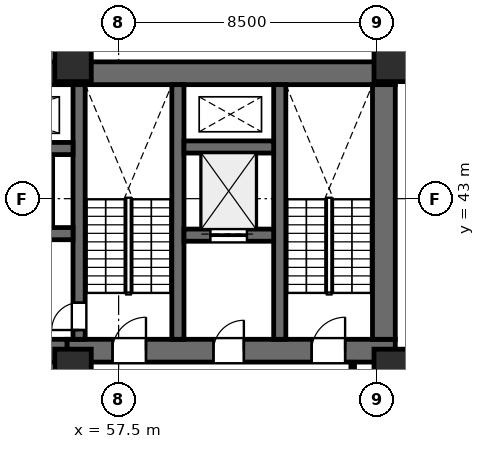
"""IFC4 building model, lengths in metres.
Left out: names, types, materials, properties, quantities, classifications, styles, units other than length and angle.
Written with IfcOpenShell. Run it as: python <this file> out.ifc"""

import sys

from ifc_helpers import new_model, si_unit, direction, frame, frame_2d, origin, origin_2d, place, context, subcontext, project, spatial, rectangle, extrude, element, fill, save


model = new_model("IFC4")
c1 = context("Model", 3, precision=1e-05, world=origin(), true_north=direction((0.0, 1.0)))
c2 = subcontext(c1, "Body", "Model", "MODEL_VIEW")
j1 = project(units=[si_unit("LENGTHUNIT", "METRE"), si_unit("PLANEANGLEUNIT", "RADIAN")], contexts=[c1])
p1 = place(None, origin())
s1 = spatial("IfcSite", under=j1, at=p1, CompositionType="ELEMENT")
p2 = place(p1, origin())
s2 = spatial("IfcBuilding", under=s1, at=p2, CompositionType="ELEMENT")
p3 = place(p2, frame((0.0, 0.0, 29.5)))
s3 = spatial("IfcBuildingStorey", under=s2, at=p3, CompositionType="ELEMENT", Elevation=29.5)
p4 = place(p3, frame((22.9, 47.125, 0.0), z_axis=(0.0, 0.0, 1.0), x_axis=(1.0, 0.0, 0.0)))
e1 = element("IfcWall", 1, at=p4, inside=s3, PredefinedType="SHEAR", context=c2, shape_type="SweptSolid", body=[
    extrude(rectangle(XDim=43.7, YDim=0.75, at=frame_2d((21.85, 0.0))), origin(), (0.0, 0.0, 1.0), 4.0),
])
p5 = place(p3, frame((55.8, 38.0, 0.0), z_axis=(0.0, 0.0, 1.0), x_axis=(1.0, 0.0, 0.0)))
e2 = element("IfcWall", 2, at=p5, inside=s3, PredefinedType="SHEAR", context=c2, shape_type="SweptSolid", body=[
    extrude(rectangle(XDim=10.8, YDim=0.75, at=frame_2d((5.4, 0.0))), origin(), (0.0, 0.0, 1.0), 4.0),
])
p6 = place(p5, frame((1.5, 0.0, 0.0)))
e3 = element("IfcOpeningElement", 3, at=p6, cuts=e2, PredefinedType="OPENING", context=c2, shape_type="SweptSolid", body=[
    extrude(rectangle(XDim=1.1, YDim=2.2, at=frame_2d((0.55, 1.1))), frame((0.0, 0.385, 0.0), z_axis=(0.0, -1.0, 0.0), x_axis=(1.0, 0.0, 0.0)), (0.0, 0.0, 1.0), 0.77),
])
p7 = place(p5, frame((4.82, 0.0, 0.0)))
e4 = element("IfcOpeningElement", 4, at=p7, cuts=e2, PredefinedType="OPENING", context=c2, shape_type="SweptSolid", body=[
    extrude(rectangle(XDim=1.0, YDim=2.15, at=frame_2d((0.5, 1.075))), frame((0.0, 0.385, 0.0), z_axis=(0.0, -1.0, 0.0), x_axis=(1.0, 0.0, 0.0)), (0.0, 0.0, 1.0), 0.77),
])
p8 = place(p5, frame((8.05, 0.0, 0.0)))
e5 = element("IfcOpeningElement", 5, at=p8, cuts=e2, PredefinedType="OPENING", context=c2, shape_type="SweptSolid", body=[
    extrude(rectangle(XDim=1.1, YDim=2.2, at=frame_2d((0.55, 1.1))), frame((0.0, 0.385, 0.0), z_axis=(0.0, -1.0, 0.0), x_axis=(1.0, 0.0, 0.0)), (0.0, 0.0, 1.0), 0.77),
])
p9 = place(p3, frame((66.225, 38.375, 0.0), z_axis=(0.0, 0.0, 1.0), x_axis=(0.0, 1.0, 0.0)))
e6 = element("IfcWall", 6, at=p9, inside=s3, PredefinedType="SHEAR", context=c2, shape_type="SweptSolid", body=[
    extrude(rectangle(XDim=8.375, YDim=0.75, at=frame_2d((4.188, 0.0))), origin(), (0.0, 0.0, 1.0), 4.0),
])
for number, where, z_axis, x_axis in (
    (7, (62.8, 38.375, 0.0), (0.0, 0.0, 1.0), (0.0, 1.0, 0.0)),
    (8, (59.45, 38.375, 0.0), (0.0, 0.0, 1.0), (0.0, 1.0, 0.0)),
):
    element("IfcWall", number, at=place(p3, frame(where, z_axis=z_axis, x_axis=x_axis)), inside=s3, PredefinedType="SHEAR", context=c2, shape_type="SweptSolid", body=[
        extrude(rectangle(XDim=8.375, YDim=0.4, at=frame_2d((4.188, 0.0))), origin(), (0.0, 0.0, 1.0), 4.0),
    ])
p10 = place(p3, frame((56.2, 38.375, 0.0), z_axis=(0.0, 0.0, 1.0), x_axis=(0.0, 1.0, 0.0)))
e9 = element("IfcWall", 9, at=p10, inside=s3, PredefinedType="SHEAR", context=c2, shape_type="SweptSolid", body=[
    extrude(rectangle(XDim=8.375, YDim=0.4, at=frame_2d((4.188, 0.0))), origin(), (0.0, 0.0, 1.0), 4.0),
])
p11 = place(p10, frame((0.305, 0.0, 0.0)))
e10 = element("IfcOpeningElement", 10, at=p11, cuts=e9, PredefinedType="OPENING", context=c2, shape_type="SweptSolid", body=[
    extrude(rectangle(XDim=0.9, YDim=2.15, at=frame_2d((0.45, 1.075))), frame((0.0, 0.21, 0.0), z_axis=(0.0, -1.0, 0.0), x_axis=(1.0, 0.0, 0.0)), (0.0, 0.0, 1.0), 0.42),
])
p12 = place(p3, frame((59.65, 41.8, 0.0), z_axis=(0.0, 0.0, 1.0), x_axis=(1.0, 0.0, 0.0)))
e11 = element("IfcWall", 11, at=p12, inside=s3, PredefinedType="SHEAR", context=c2, shape_type="SweptSolid", body=[
    extrude(rectangle(XDim=2.95, YDim=0.4, at=frame_2d((1.475, 0.0))), origin(), (0.0, 0.0, 1.0), 4.0),
])
p13 = place(p12, frame((0.87, 0.0, 0.0)))
e12 = element("IfcOpeningElement", 12, at=p13, cuts=e11, PredefinedType="OPENING", context=c2, shape_type="SweptSolid", body=[
    extrude(rectangle(XDim=1.2, YDim=2.2, at=frame_2d((0.6, 1.1))), frame((0.0, 0.21, 0.0), z_axis=(0.0, -1.0, 0.0), x_axis=(1.0, 0.0, 0.0)), (0.0, 0.0, 1.0), 0.42),
])
p14 = place(p3, frame((59.65, 44.7, 0.0), z_axis=(0.0, 0.0, 1.0), x_axis=(1.0, 0.0, 0.0)))
e13 = element("IfcWall", 13, at=p14, inside=s3, PredefinedType="SHEAR", context=c2, shape_type="SweptSolid", body=[
    extrude(rectangle(XDim=2.95, YDim=0.4, at=frame_2d((1.475, 0.0))), origin(), (0.0, 0.0, 1.0), 4.0),
])
p15 = place(p3, frame((50.8, 38.0, 0.0), z_axis=(0.0, 0.0, 1.0), x_axis=(1.0, 0.0, 0.0)))
e14 = element("IfcWall", 14, at=p15, inside=s3, PredefinedType="SHEAR", context=c2, shape_type="SweptSolid", body=[
    extrude(rectangle(XDim=5.0, YDim=0.75, at=frame_2d((2.5, 0.0))), origin(), (0.0, 0.0, 1.0), 4.0),
])
p16 = place(p15, frame((2.0, 0.0, 0.0)))
e15 = element("IfcOpeningElement", 15, at=p16, cuts=e14, PredefinedType="OPENING", context=c2, shape_type="SweptSolid", body=[
    extrude(rectangle(XDim=1.2, YDim=2.2, at=frame_2d((0.6, 1.1))), frame((0.0, 0.385, 0.0), z_axis=(0.0, -1.0, 0.0), x_axis=(1.0, 0.0, 0.0)), (0.0, 0.0, 1.0), 0.77),
])
p17 = place(p3, frame((51.25, 41.85, 0.0), z_axis=(0.0, 0.0, 1.0), x_axis=(1.0, 0.0, 0.0)))
e16 = element("IfcWall", 16, at=p17, inside=s3, PredefinedType="SHEAR", context=c2, shape_type="SweptSolid", body=[
    extrude(rectangle(XDim=4.75, YDim=0.4, at=frame_2d((2.375, 0.0))), origin(), (0.0, 0.0, 1.0), 4.0),
])
p18 = place(p17, frame((0.5, 0.0, 0.0)))
e17 = element("IfcOpeningElement", 17, at=p18, cuts=e16, PredefinedType="OPENING", context=c2, shape_type="SweptSolid", body=[
    extrude(rectangle(XDim=1.2, YDim=2.2, at=frame_2d((0.6, 1.1))), frame((0.0, 0.21, 0.0), z_axis=(0.0, -1.0, 0.0), x_axis=(1.0, 0.0, 0.0)), (0.0, 0.0, 1.0), 0.42),
])
p19 = place(p17, frame((2.6, 0.0, 0.0)))
e18 = element("IfcOpeningElement", 18, at=p19, cuts=e16, PredefinedType="OPENING", context=c2, shape_type="SweptSolid", body=[
    extrude(rectangle(XDim=1.2, YDim=2.2, at=frame_2d((0.6, 1.1))), frame((0.0, 0.21, 0.0), z_axis=(0.0, -1.0, 0.0), x_axis=(1.0, 0.0, 0.0)), (0.0, 0.0, 1.0), 0.42),
])
p20 = place(p3, frame((51.25, 44.65, 0.0), z_axis=(0.0, 0.0, 1.0), x_axis=(1.0, 0.0, 0.0)))
e19 = element("IfcWall", 19, at=p20, inside=s3, PredefinedType="SHEAR", context=c2, shape_type="SweptSolid", body=[
    extrude(rectangle(XDim=4.75, YDim=0.4, at=frame_2d((2.375, 0.0))), origin(), (0.0, 0.0, 1.0), 4.0),
])
for number, where, z_axis, x_axis in (
    (20, (66.5, 47.55, 0.0), (0.0, 0.0, 1.0), (1.0, 0.0, 0.0)),
    (21, (56.0, 47.55, 0.0), (0.0, 0.0, 1.0), (1.0, 0.0, 0.0)),
    (22, (66.5, 37.35, 0.0), (0.0, 0.0, 1.0), (1.0, 0.0, 0.0)),
    (23, (56.0, 37.35, 0.0), (0.0, 0.0, 1.0), (1.0, 0.0, 0.0)),
):
    element("IfcColumn", number, at=place(p3, frame(where, z_axis=z_axis, x_axis=x_axis)), inside=s3, PredefinedType="COLUMN", context=c2, shape_type="SweptSolid", body=[
        extrude(rectangle(XDim=1.2, YDim=1.4, at=origin_2d()), origin(), (0.0, 0.0, 1.0), 4.0),
    ])
p21 = place(p3, frame((65.2, 34.4, 0.0), z_axis=(0.0, 0.0, 1.0), x_axis=(0.0, 1.0, 0.0)))
e24 = element("IfcWall", 24, at=p21, inside=s3, PredefinedType="PARTITIONING", context=c2, shape_type="SweptSolid", body=[
    extrude(rectangle(XDim=3.217, YDim=0.12, at=frame_2d((1.608, 0.0))), origin(), (0.0, 0.0, 1.0), 2.813),
])
p22 = place(p6, origin())
e25 = element("IfcDoor", 25, at=p22, inside=s3, OperationType="SINGLE_SWING_RIGHT", PredefinedType="DOOR", context=c2, shape_type="SweptSolid", body=[
    extrude(rectangle(XDim=1.1, YDim=2.2, at=frame_2d((0.55, 1.1))), frame((0.0, 0.025, 0.0), z_axis=(0.0, -1.0, 0.0), x_axis=(1.0, 0.0, 0.0)), (0.0, 0.0, 1.0), 0.05),
])
fill(e3, e25)
p23 = place(p7, origin())
e26 = element("IfcDoor", 26, at=p23, inside=s3, OperationType="SINGLE_SWING_RIGHT", PredefinedType="DOOR", context=c2, shape_type="SweptSolid", body=[
    extrude(rectangle(XDim=1.0, YDim=2.15, at=frame_2d((0.5, 1.075))), frame((0.0, 0.025, 0.0), z_axis=(0.0, -1.0, 0.0), x_axis=(1.0, 0.0, 0.0)), (0.0, 0.0, 1.0), 0.05),
])
fill(e4, e26)
p24 = place(p8, origin())
e27 = element("IfcDoor", 27, at=p24, inside=s3, OperationType="SINGLE_SWING_RIGHT", PredefinedType="DOOR", context=c2, shape_type="SweptSolid", body=[
    extrude(rectangle(XDim=1.1, YDim=2.2, at=frame_2d((0.55, 1.1))), frame((0.0, 0.025, 0.0), z_axis=(0.0, -1.0, 0.0), x_axis=(1.0, 0.0, 0.0)), (0.0, 0.0, 1.0), 0.05),
])
fill(e5, e27)
p25 = place(p11, origin())
e28 = element("IfcDoor", 28, at=p25, inside=s3, OperationType="SINGLE_SWING_LEFT", PredefinedType="DOOR", context=c2, shape_type="SweptSolid", body=[
    extrude(rectangle(XDim=0.9, YDim=2.15, at=frame_2d((0.45, 1.075))), frame((0.0, 0.025, 0.0), z_axis=(0.0, -1.0, 0.0), x_axis=(1.0, 0.0, 0.0)), (0.0, 0.0, 1.0), 0.05),
])
fill(e10, e28)
p26 = place(p13, origin())
e29 = element("IfcDoor", 29, at=p26, inside=s3, OperationType="DOUBLE_DOOR_SLIDING", PredefinedType="DOOR", context=c2, shape_type="SweptSolid", body=[
    extrude(rectangle(XDim=1.2, YDim=2.2, at=frame_2d((0.6, 1.1))), frame((0.0, 0.025, 0.0), z_axis=(0.0, -1.0, 0.0), x_axis=(1.0, 0.0, 0.0)), (0.0, 0.0, 1.0), 0.05),
])
fill(e12, e29)
save(model, sys.argv[1])
